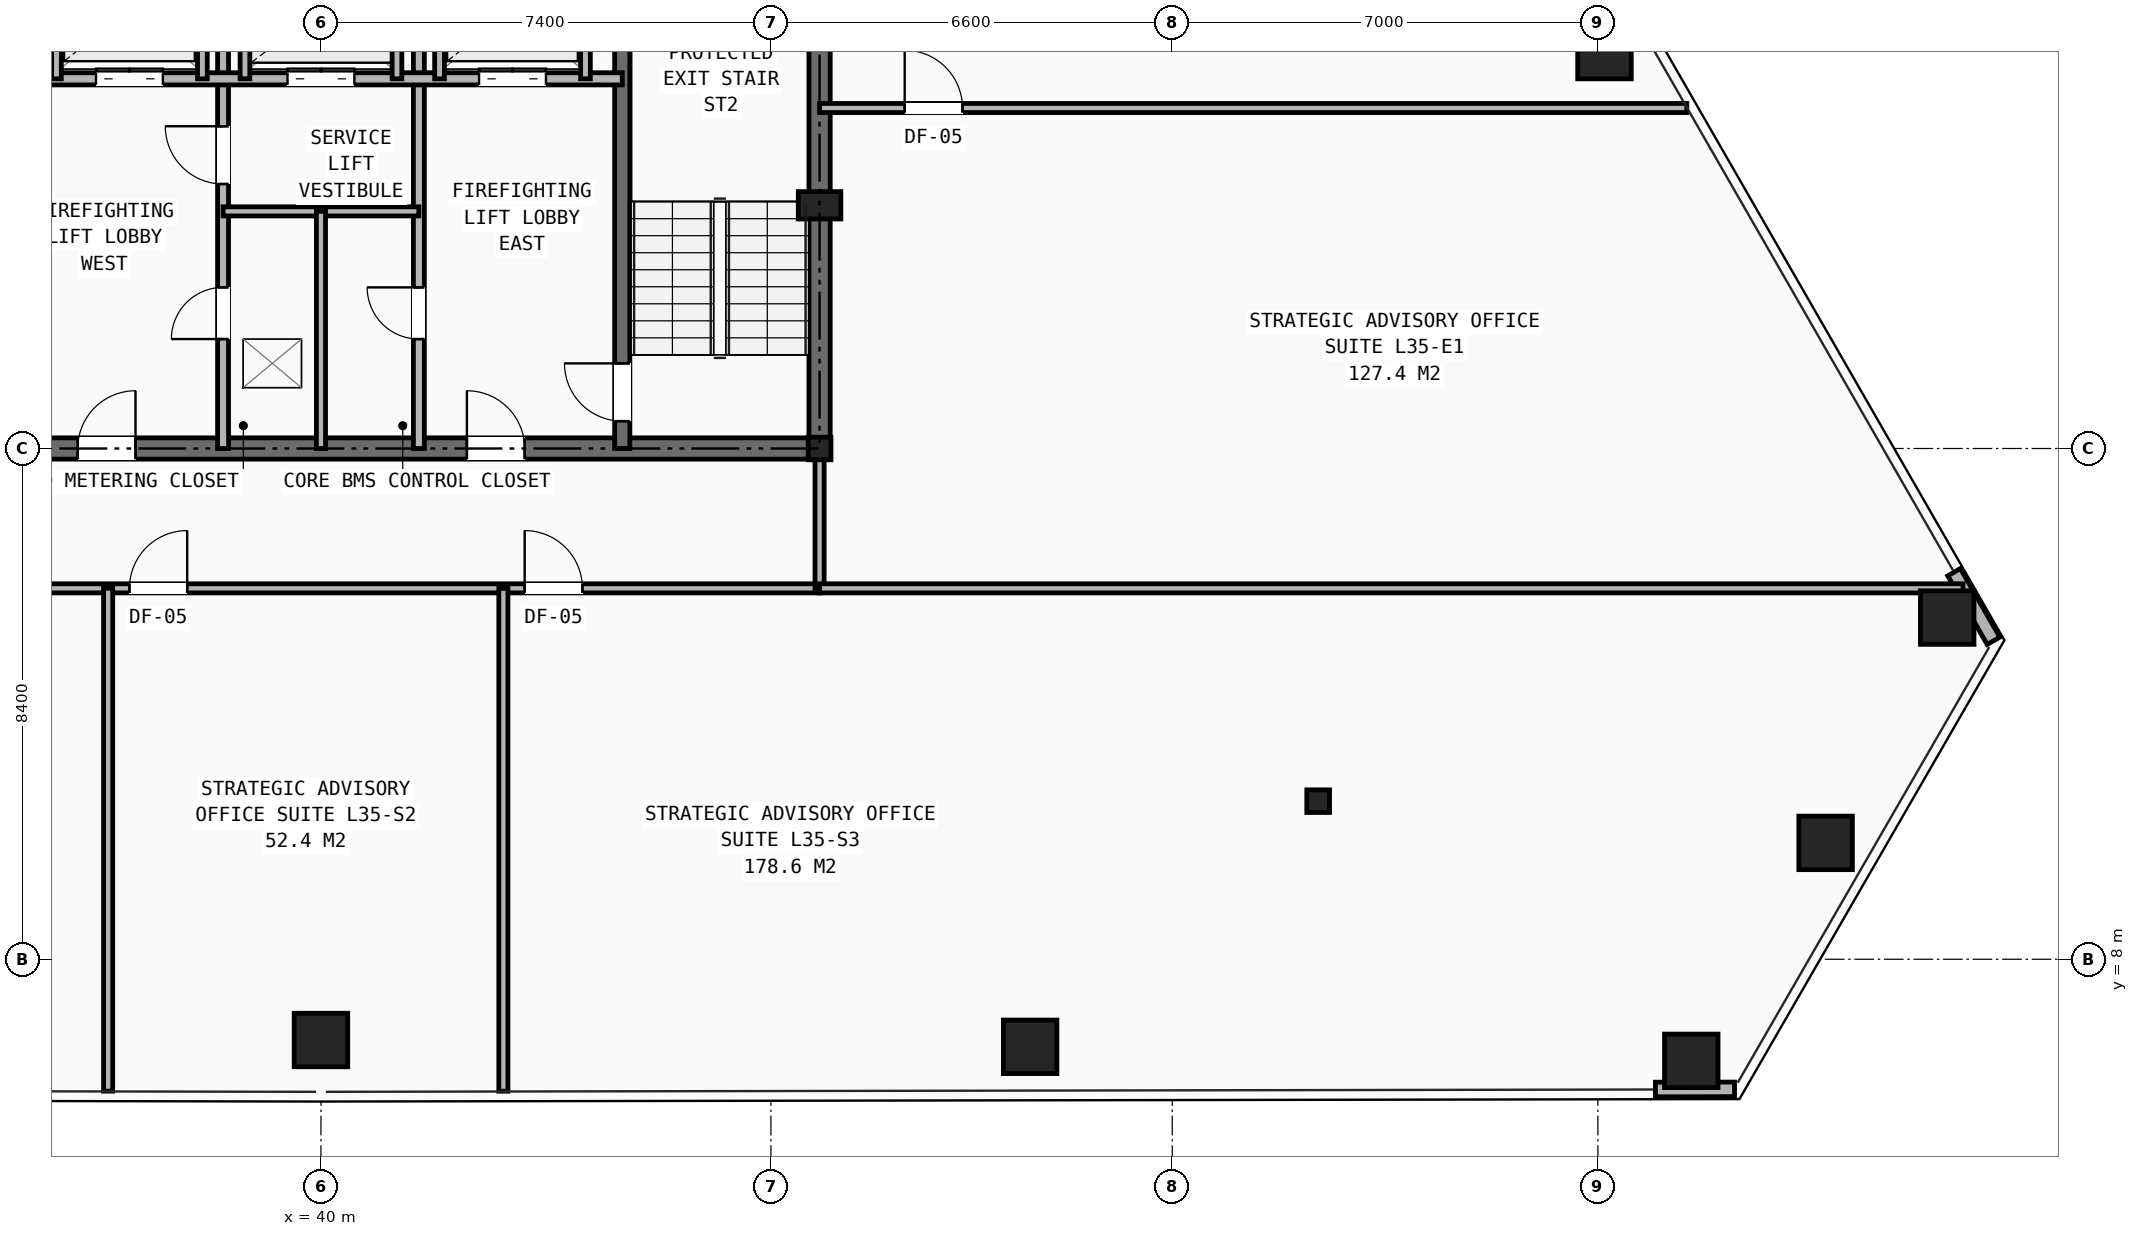
"""IFC4 building model, lengths in metres.
Left out: names, types, materials, properties, quantities, classifications, styles, units other than length and angle.
Written with IfcOpenShell. Run it as: python <this file> out.ifc"""

import sys

from ifc_helpers import new_model, si_unit, direction, frame, frame_2d, origin, origin_2d, place, context, subcontext, project, spatial, rectangle, hollow_rectangle, i_section, extrude, element, fill, save


model = new_model("IFC4")
c1 = context("Model", 3, precision=1e-05, world=origin(), true_north=direction((0.0, 1.0)))
c2 = subcontext(c1, "Body", "Model", "MODEL_VIEW")
j1 = project(units=[si_unit("LENGTHUNIT", "METRE"), si_unit("PLANEANGLEUNIT", "RADIAN")], contexts=[c1])
p1 = place(None, origin())
s1 = spatial("IfcSite", under=j1, at=p1, CompositionType="ELEMENT")
p2 = place(p1, origin())
s2 = spatial("IfcBuilding", under=s1, at=p2, CompositionType="ELEMENT")
p3 = place(p2, frame((0.0, 0.0, 122.9)))
s3 = spatial("IfcBuildingStorey", under=s2, at=p3, CompositionType="ELEMENT", Elevation=122.9)
for number, where, z_axis, x_axis in (
    (1, (48.2, 16.4, 0.0), (0.0, 0.0, 1.0), (1.0, 0.0, 0.0)),
    (2, (56.4, 10.6, 0.0), (0.0, 0.0, 1.0), (1.0, 0.0, 0.0)),
):
    element("IfcColumn", number, at=place(p3, frame(where, z_axis=z_axis, x_axis=x_axis)), inside=s3, PredefinedType="COLUMN", context=c2, shape_type="SweptSolid", body=[
        extrude(i_section(OverallWidth=0.374, OverallDepth=0.372, WebThickness=0.016, FlangeThickness=0.026, at=origin_2d()), origin(), (0.0, 0.0, 1.0), 3.45),
    ])
p4 = place(p3, frame((48.2, 20.4, 0.0), z_axis=(0.0, 0.0, 1.0), x_axis=(1.0, 0.0, 0.0)))
e3 = element("IfcColumn", 3, at=p4, inside=s3, PredefinedType="PILASTER", context=c2, shape_type="SweptSolid", body=[
    extrude(rectangle(XDim=0.7, YDim=0.45, at=origin_2d()), origin(), (0.0, 0.0, 1.0), 3.45),
])
for number, where, z_axis, x_axis in (
    (4, (40.0, 6.671, 0.0), (0.0, 0.0, 1.0), (1.0, 0.0, 0.0)),
    (5, (51.663, 6.56, 0.0), (0.0, 0.0, 1.0), (1.0, 0.0, 0.0)),
    (6, (62.536, 6.329, 0.0), (0.0, 0.0, 1.0), (1.0, 0.0, 0.0)),
    (7, (64.745, 9.913, 0.0), (0.0, 0.0, 1.0), (1.0, 0.0, 0.0)),
    (8, (66.745, 13.619, 0.0), (0.0, 0.0, 1.0), (1.0, 0.0, 0.0)),
    (9, (61.108, 22.92, 0.0), (0.0, 0.0, 1.0), (1.0, 0.0, 0.0)),
):
    element("IfcColumn", number, at=place(p3, frame(where, z_axis=z_axis, x_axis=x_axis)), inside=s3, PredefinedType="COLUMN", context=c2, shape_type="SweptSolid", body=[
        extrude(hollow_rectangle(XDim=0.88, YDim=0.88, WallThickness=0.06, at=origin_2d()), origin(), (0.0, 0.0, 1.0), 3.45),
    ])
p5 = place(p3, frame((61.946, 5.858, 0.0), z_axis=(0.0, 0.0, 1.0), x_axis=(0.999998574928, 0.001688236199, 0.0)))
e10 = element("IfcWall", 10, at=p5, inside=s3, PredefinedType="SHEAR", context=c2, shape_type="SweptSolid", body=[
    extrude(rectangle(XDim=1.302, YDim=0.24, at=frame_2d((0.651, 0.0))), origin(), (0.0, 0.0, 1.0), 2.583),
])
p6 = place(p3, frame((67.507, 13.237, 0.0), z_axis=(0.0, 0.0, 1.0), x_axis=(-0.498460550087, 0.86691238312, 0.0)))
e11 = element("IfcWall", 11, at=p6, inside=s3, PredefinedType="SHEAR", context=c2, shape_type="SweptSolid", body=[
    extrude(rectangle(XDim=1.301, YDim=0.24, at=frame_2d((0.651, 0.0))), origin(), (0.0, 0.0, 1.0), 2.583),
])
p7 = place(p3, frame((31.8, 16.4, 0.0), z_axis=(0.0, 0.0, 1.0), x_axis=(1.0, 0.0, 0.0)))
e12 = element("IfcWall", 12, at=p7, inside=s3, PredefinedType="SHEAR", context=c2, shape_type="SweptSolid", body=[
    extrude(rectangle(XDim=16.4, YDim=0.35, at=frame_2d((8.2, 0.0))), origin(), (0.0, 0.0, 1.0), 3.21),
])
p8 = place(p7, frame((4.2, 0.0, 0.0)))
e13 = element("IfcOpeningElement", 13, at=p8, cuts=e12, PredefinedType="OPENING", context=c2, shape_type="SweptSolid", body=[
    extrude(rectangle(XDim=0.95, YDim=2.1, at=frame_2d((0.475, 1.05))), frame((0.0, 0.185, 0.0), z_axis=(0.0, -1.0, 0.0), x_axis=(1.0, 0.0, 0.0)), (0.0, 0.0, 1.0), 0.37),
])
p9 = place(p7, frame((10.6, 0.0, 0.0)))
e14 = element("IfcOpeningElement", 14, at=p9, cuts=e12, PredefinedType="OPENING", context=c2, shape_type="SweptSolid", body=[
    extrude(rectangle(XDim=0.95, YDim=2.1, at=frame_2d((0.475, 1.05))), frame((0.0, 0.185, 0.0), z_axis=(0.0, -1.0, 0.0), x_axis=(1.0, 0.0, 0.0)), (0.0, 0.0, 1.0), 0.37),
])
p10 = place(p3, frame((48.2, 16.4, 0.0), z_axis=(0.0, 0.0, 1.0), x_axis=(0.0, 1.0, 0.0)))
e15 = element("IfcWall", 15, at=p10, inside=s3, PredefinedType="SHEAR", context=c2, shape_type="SweptSolid", body=[
    extrude(rectangle(XDim=14.8, YDim=0.35, at=frame_2d((7.4, 0.0))), origin(), (0.0, 0.0, 1.0), 3.21),
])
p11 = place(p10, frame((11.0, 0.0, 0.0)))
e16 = element("IfcOpeningElement", 16, at=p11, cuts=e15, PredefinedType="OPENING", context=c2, shape_type="SweptSolid", body=[
    extrude(rectangle(XDim=1.1, YDim=2.15, at=frame_2d((0.55, 1.075))), frame((0.0, 0.185, 0.0), z_axis=(0.0, -1.0, 0.0), x_axis=(1.0, 0.0, 0.0)), (0.0, 0.0, 1.0), 0.37),
])
p12 = place(p3, frame((44.955, 16.4, 0.0), z_axis=(0.0, 0.0, 1.0), x_axis=(0.0, 1.0, 0.0)))
e17 = element("IfcWall", 17, at=p12, inside=s3, PredefinedType="SHEAR", context=c2, shape_type="SweptSolid", body=[
    extrude(rectangle(XDim=8.4, YDim=0.25, at=frame_2d((4.2, 0.0))), origin(), (0.0, 0.0, 1.0), 3.21),
])
p13 = place(p12, frame((0.45, 0.0, 0.0)))
e18 = element("IfcOpeningElement", 18, at=p13, cuts=e17, PredefinedType="OPENING", context=c2, shape_type="SweptSolid", body=[
    extrude(rectangle(XDim=0.95, YDim=2.1, at=frame_2d((0.475, 1.05))), frame((0.0, 0.135, 0.0), z_axis=(0.0, -1.0, 0.0), x_axis=(1.0, 0.0, 0.0)), (0.0, 0.0, 1.0), 0.27),
])
p14 = place(p3, frame((38.39, 16.4, 0.0), z_axis=(0.0, 0.0, 1.0), x_axis=(0.0, 1.0, 0.0)))
e19 = element("IfcWall", 19, at=p14, inside=s3, PredefinedType="PARTITIONING", context=c2, shape_type="SweptSolid", body=[
    extrude(rectangle(XDim=8.4, YDim=0.18, at=frame_2d((4.2, 0.0))), origin(), (0.0, 0.0, 1.0), 2.938),
])
p15 = place(p14, frame((1.8, 0.0, 0.0)))
e20 = element("IfcOpeningElement", 20, at=p15, cuts=e19, PredefinedType="OPENING", context=c2, shape_type="SweptSolid", body=[
    extrude(rectangle(XDim=0.85, YDim=2.05, at=frame_2d((0.425, 1.025))), frame((0.0, 0.1, 0.0), z_axis=(0.0, -1.0, 0.0), x_axis=(1.0, 0.0, 0.0)), (0.0, 0.0, 1.0), 0.2),
])
p16 = place(p14, frame((4.35, 0.0, 0.0)))
e21 = element("IfcOpeningElement", 21, at=p16, cuts=e19, PredefinedType="OPENING", context=c2, shape_type="SweptSolid", body=[
    extrude(rectangle(XDim=0.95, YDim=2.1, at=frame_2d((0.475, 1.05))), frame((0.0, 0.1, 0.0), z_axis=(0.0, -1.0, 0.0), x_axis=(1.0, 0.0, 0.0)), (0.0, 0.0, 1.0), 0.2),
])
p17 = place(p3, frame((41.61, 16.4, 0.0), z_axis=(0.0, 0.0, 1.0), x_axis=(0.0, 1.0, 0.0)))
e22 = element("IfcWall", 22, at=p17, inside=s3, PredefinedType="PARTITIONING", context=c2, shape_type="SweptSolid", body=[
    extrude(rectangle(XDim=8.4, YDim=0.18, at=frame_2d((4.2, 0.0))), origin(), (0.0, 0.0, 1.0), 2.938),
])
p18 = place(p17, frame((1.8, 0.0, 0.0)))
e23 = element("IfcOpeningElement", 23, at=p18, cuts=e22, PredefinedType="OPENING", context=c2, shape_type="SweptSolid", body=[
    extrude(rectangle(XDim=0.85, YDim=2.05, at=frame_2d((0.425, 1.025))), frame((0.0, 0.1, 0.0), z_axis=(0.0, -1.0, 0.0), x_axis=(1.0, 0.0, 0.0)), (0.0, 0.0, 1.0), 0.2),
])
p19 = place(p3, frame((35.045, 22.48, 0.0), z_axis=(0.0, 0.0, 1.0), x_axis=(1.0, 0.0, 0.0)))
e24 = element("IfcWall", 24, at=p19, inside=s3, PredefinedType="SOLIDWALL", context=c2, shape_type="SweptSolid", body=[
    extrude(rectangle(XDim=9.91, YDim=0.2, at=frame_2d((4.955, 0.0))), origin(), (0.0, 0.0, 1.0), 3.21),
])
p20 = place(p19, frame((1.255, 0.0, 0.0)))
e25 = element("IfcOpeningElement", 25, at=p20, cuts=e24, PredefinedType="OPENING", context=c2, shape_type="SweptSolid", body=[
    extrude(rectangle(XDim=1.1, YDim=2.15, at=frame_2d((0.55, 1.075))), frame((0.0, 0.11, 0.0), z_axis=(0.0, -1.0, 0.0), x_axis=(1.0, 0.0, 0.0)), (0.0, 0.0, 1.0), 0.22),
])
p21 = place(p19, frame((7.555, 0.0, 0.0)))
e26 = element("IfcOpeningElement", 26, at=p21, cuts=e24, PredefinedType="OPENING", context=c2, shape_type="SweptSolid", body=[
    extrude(rectangle(XDim=1.1, YDim=2.15, at=frame_2d((0.55, 1.075))), frame((0.0, 0.11, 0.0), z_axis=(0.0, -1.0, 0.0), x_axis=(1.0, 0.0, 0.0)), (0.0, 0.0, 1.0), 0.22),
])
p22 = place(p19, frame((4.405, 0.0, 0.0)))
e27 = element("IfcOpeningElement", 27, at=p22, cuts=e24, PredefinedType="OPENING", context=c2, shape_type="SweptSolid", body=[
    extrude(rectangle(XDim=1.1, YDim=2.15, at=frame_2d((0.55, 1.075))), frame((0.0, 0.11, 0.0), z_axis=(0.0, -1.0, 0.0), x_axis=(1.0, 0.0, 0.0)), (0.0, 0.0, 1.0), 0.22),
])
p23 = place(p3, frame((38.39, 20.3, 0.0), z_axis=(0.0, 0.0, 1.0), x_axis=(1.0, 0.0, 0.0)))
e28 = element("IfcWall", 28, at=p23, inside=s3, PredefinedType="PARTITIONING", context=c2, shape_type="SweptSolid", body=[
    extrude(rectangle(XDim=3.22, YDim=0.15, at=frame_2d((1.61, 0.0))), origin(), (0.0, 0.0, 1.0), 3.21),
])
p24 = place(p3, frame((40.0, 16.4, 0.0), z_axis=(0.0, 0.0, 1.0), x_axis=(0.0, 1.0, 0.0)))
e29 = element("IfcWall", 29, at=p24, inside=s3, PredefinedType="PARTITIONING", context=c2, shape_type="SweptSolid", body=[
    extrude(rectangle(XDim=3.9, YDim=0.15, at=frame_2d((1.95, 0.0))), origin(), (0.0, 0.0, 1.0), 2.938),
])
for number, where, z_axis, x_axis in (
    (30, (35.65, 22.48, 0.0), (0.0, 0.0, 1.0), (0.0, 1.0, 0.0)),
    (31, (38.05, 22.48, 0.0), (0.0, 0.0, 1.0), (0.0, 1.0, 0.0)),
    (32, (41.95, 22.48, 0.0), (0.0, 0.0, 1.0), (0.0, 1.0, 0.0)),
    (33, (44.35, 22.48, 0.0), (0.0, 0.0, 1.0), (0.0, 1.0, 0.0)),
    (34, (38.75, 22.48, 0.0), (0.0, 0.0, 1.0), (0.0, 1.0, 0.0)),
    (35, (41.25, 22.48, 0.0), (0.0, 0.0, 1.0), (0.0, 1.0, 0.0)),
):
    element("IfcWall", number, at=place(p3, frame(where, z_axis=z_axis, x_axis=x_axis)), inside=s3, PredefinedType="SOLIDWALL", context=c2, shape_type="SweptSolid", body=[
        extrude(rectangle(XDim=2.32, YDim=0.16, at=frame_2d((1.16, 0.0))), origin(), (0.0, 0.0, 1.0), 3.21),
    ])
p25 = place(p3, frame((29.6, 14.1, 0.0), z_axis=(0.0, 0.0, 1.0), x_axis=(1.0, 0.0, 0.0)))
e36 = element("IfcWall", 36, at=p25, inside=s3, PredefinedType="PARTITIONING", context=c2, shape_type="SweptSolid", body=[
    extrude(rectangle(XDim=18.6, YDim=0.15, at=frame_2d((9.3, 0.0))), origin(), (0.0, 0.0, 1.0), 2.252),
])
p26 = place(p25, frame((0.55, 0.0, 0.0)))
e37 = element("IfcOpeningElement", 37, at=p26, cuts=e36, PredefinedType="OPENING", context=c2, shape_type="SweptSolid", body=[
    extrude(rectangle(XDim=0.95, YDim=2.1, at=frame_2d((0.475, 1.05))), frame((0.0, 0.085, 0.0), z_axis=(0.0, -1.0, 0.0), x_axis=(1.0, 0.0, 0.0)), (0.0, 0.0, 1.0), 0.17),
])
p27 = place(p25, frame((7.25, 0.0, 0.0)))
e38 = element("IfcOpeningElement", 38, at=p27, cuts=e36, PredefinedType="OPENING", context=c2, shape_type="SweptSolid", body=[
    extrude(rectangle(XDim=0.95, YDim=2.1, at=frame_2d((0.475, 1.05))), frame((0.0, 0.085, 0.0), z_axis=(0.0, -1.0, 0.0), x_axis=(1.0, 0.0, 0.0)), (0.0, 0.0, 1.0), 0.17),
])
p28 = place(p25, frame((13.75, 0.0, 0.0)))
e39 = element("IfcOpeningElement", 39, at=p28, cuts=e36, PredefinedType="OPENING", context=c2, shape_type="SweptSolid", body=[
    extrude(rectangle(XDim=0.95, YDim=2.1, at=frame_2d((0.475, 1.05))), frame((0.0, 0.085, 0.0), z_axis=(0.0, -1.0, 0.0), x_axis=(1.0, 0.0, 0.0)), (0.0, 0.0, 1.0), 0.17),
])
p29 = place(p3, frame((48.2, 14.1, 0.0), z_axis=(0.0, 0.0, 1.0), x_axis=(0.0, 1.0, 0.0)))
e40 = element("IfcWall", 40, at=p29, inside=s3, PredefinedType="PARTITIONING", context=c2, shape_type="SweptSolid", body=[
    extrude(rectangle(XDim=2.3, YDim=0.15, at=frame_2d((1.15, 0.0))), origin(), (0.0, 0.0, 1.0), 2.661),
])
p30 = place(p3, frame((36.5, 5.83, 0.0), z_axis=(0.0, 0.0, 1.0), x_axis=(0.0, 1.0, 0.0)))
e41 = element("IfcWall", 41, at=p30, inside=s3, PredefinedType="PARTITIONING", context=c2, shape_type="SweptSolid", body=[
    extrude(rectangle(XDim=8.27, YDim=0.15, at=frame_2d((4.135, 0.0))), origin(), (0.0, 0.0, 1.0), 2.252),
])
p31 = place(p3, frame((43.0, 5.83, 0.0), z_axis=(0.0, 0.0, 1.0), x_axis=(0.0, 1.0, 0.0)))
e42 = element("IfcWall", 42, at=p31, inside=s3, PredefinedType="PARTITIONING", context=c2, shape_type="SweptSolid", body=[
    extrude(rectangle(XDim=8.271, YDim=0.15, at=frame_2d((4.135, 0.0))), origin(), (0.0, 0.0, 1.0), 2.589),
])
p32 = place(p3, frame((48.2, 14.1, 0.0), z_axis=(0.0, 0.0, 1.0), x_axis=(1.0, 0.0, 0.0)))
e43 = element("IfcWall", 43, at=p32, inside=s3, PredefinedType="PARTITIONING", context=c2, shape_type="SweptSolid", body=[
    extrude(rectangle(XDim=18.805, YDim=0.15, at=frame_2d((9.402, 0.0))), origin(), (0.0, 0.0, 1.0), 2.589),
])
p33 = place(p3, frame((48.2, 22.0, 0.0), z_axis=(0.0, 0.0, 1.0), x_axis=(1.0, 0.0, 0.0)))
e44 = element("IfcWall", 44, at=p33, inside=s3, PredefinedType="PARTITIONING", context=c2, shape_type="SweptSolid", body=[
    extrude(rectangle(XDim=14.262, YDim=0.15, at=frame_2d((7.131, 0.0))), origin(), (0.0, 0.0, 1.0), 2.589),
])
p34 = place(p33, frame((1.4, 0.0, 0.0)))
e45 = element("IfcOpeningElement", 45, at=p34, cuts=e44, PredefinedType="OPENING", context=c2, shape_type="SweptSolid", body=[
    extrude(rectangle(XDim=0.95, YDim=2.1, at=frame_2d((0.475, 1.05))), frame((0.0, 0.085, 0.0), z_axis=(0.0, -1.0, 0.0), x_axis=(1.0, 0.0, 0.0)), (0.0, 0.0, 1.0), 0.17),
])
p35 = place(p15, origin())
e46 = element("IfcDoor", 46, at=p35, inside=s3, OperationType="SINGLE_SWING_LEFT", PredefinedType="DOOR", context=c2, shape_type="SweptSolid", body=[
    extrude(rectangle(XDim=0.85, YDim=2.05, at=frame_2d((0.425, 1.025))), frame((0.0, 0.025, 0.0), z_axis=(0.0, -1.0, 0.0), x_axis=(1.0, 0.0, 0.0)), (0.0, 0.0, 1.0), 0.05),
])
fill(e20, e46)
p36 = place(p18, origin())
e47 = element("IfcDoor", 47, at=p36, inside=s3, OperationType="SINGLE_SWING_RIGHT", PredefinedType="DOOR", context=c2, shape_type="SweptSolid", body=[
    extrude(rectangle(XDim=0.85, YDim=2.05, at=frame_2d((0.425, 1.025))), frame((0.0, 0.025, 0.0), z_axis=(0.0, -1.0, 0.0), x_axis=(1.0, 0.0, 0.0)), (0.0, 0.0, 1.0), 0.05),
])
fill(e23, e47)
p37 = place(p16, origin())
e48 = element("IfcDoor", 48, at=p37, inside=s3, OperationType="SINGLE_SWING_RIGHT", PredefinedType="DOOR", context=c2, shape_type="SweptSolid", body=[
    extrude(rectangle(XDim=0.95, YDim=2.1, at=frame_2d((0.475, 1.05))), frame((0.0, 0.025, 0.0), z_axis=(0.0, -1.0, 0.0), x_axis=(1.0, 0.0, 0.0)), (0.0, 0.0, 1.0), 0.05),
])
fill(e21, e48)
p38 = place(p13, origin())
e49 = element("IfcDoor", 49, at=p38, inside=s3, OperationType="SINGLE_SWING_RIGHT", PredefinedType="DOOR", context=c2, shape_type="SweptSolid", body=[
    extrude(rectangle(XDim=0.95, YDim=2.1, at=frame_2d((0.475, 1.05))), frame((0.0, 0.025, 0.0), z_axis=(0.0, -1.0, 0.0), x_axis=(1.0, 0.0, 0.0)), (0.0, 0.0, 1.0), 0.05),
])
fill(e18, e49)
p39 = place(p8, origin())
e50 = element("IfcDoor", 50, at=p39, inside=s3, OperationType="SINGLE_SWING_RIGHT", PredefinedType="DOOR", context=c2, shape_type="SweptSolid", body=[
    extrude(rectangle(XDim=0.95, YDim=2.1, at=frame_2d((0.475, 1.05))), frame((0.0, 0.025, 0.0), z_axis=(0.0, -1.0, 0.0), x_axis=(1.0, 0.0, 0.0)), (0.0, 0.0, 1.0), 0.05),
])
fill(e13, e50)
p40 = place(p9, origin())
e51 = element("IfcDoor", 51, at=p40, inside=s3, OperationType="SINGLE_SWING_LEFT", PredefinedType="DOOR", context=c2, shape_type="SweptSolid", body=[
    extrude(rectangle(XDim=0.95, YDim=2.1, at=frame_2d((0.475, 1.05))), frame((0.0, 0.025, 0.0), z_axis=(0.0, -1.0, 0.0), x_axis=(1.0, 0.0, 0.0)), (0.0, 0.0, 1.0), 0.05),
])
fill(e14, e51)
p41 = place(p20, origin())
e52 = element("IfcDoor", 52, at=p41, inside=s3, OperationType="DOUBLE_DOOR_SLIDING", PredefinedType="DOOR", context=c2, shape_type="SweptSolid", body=[
    extrude(rectangle(XDim=1.1, YDim=2.15, at=frame_2d((0.55, 1.075))), frame((0.0, 0.025, 0.0), z_axis=(0.0, -1.0, 0.0), x_axis=(1.0, 0.0, 0.0)), (0.0, 0.0, 1.0), 0.05),
])
fill(e25, e52)
p42 = place(p21, origin())
e53 = element("IfcDoor", 53, at=p42, inside=s3, OperationType="DOUBLE_DOOR_SLIDING", PredefinedType="DOOR", context=c2, shape_type="SweptSolid", body=[
    extrude(rectangle(XDim=1.1, YDim=2.15, at=frame_2d((0.55, 1.075))), frame((0.0, 0.025, 0.0), z_axis=(0.0, -1.0, 0.0), x_axis=(1.0, 0.0, 0.0)), (0.0, 0.0, 1.0), 0.05),
])
fill(e26, e53)
p43 = place(p22, origin())
e54 = element("IfcDoor", 54, at=p43, inside=s3, OperationType="DOUBLE_DOOR_SLIDING", PredefinedType="DOOR", context=c2, shape_type="SweptSolid", body=[
    extrude(rectangle(XDim=1.1, YDim=2.15, at=frame_2d((0.55, 1.075))), frame((0.0, 0.025, 0.0), z_axis=(0.0, -1.0, 0.0), x_axis=(1.0, 0.0, 0.0)), (0.0, 0.0, 1.0), 0.05),
])
fill(e27, e54)
p44 = place(p27, origin())
e55 = element("IfcDoor", 55, at=p44, inside=s3, OperationType="SINGLE_SWING_RIGHT", PredefinedType="DOOR", context=c2, shape_type="SweptSolid", body=[
    extrude(rectangle(XDim=0.95, YDim=2.1, at=frame_2d((0.475, 1.05))), frame((0.0, 0.025, 0.0), z_axis=(0.0, -1.0, 0.0), x_axis=(1.0, 0.0, 0.0)), (0.0, 0.0, 1.0), 0.05),
])
fill(e38, e55)
p45 = place(p28, origin())
e56 = element("IfcDoor", 56, at=p45, inside=s3, OperationType="SINGLE_SWING_LEFT", PredefinedType="DOOR", context=c2, shape_type="SweptSolid", body=[
    extrude(rectangle(XDim=0.95, YDim=2.1, at=frame_2d((0.475, 1.05))), frame((0.0, 0.025, 0.0), z_axis=(0.0, -1.0, 0.0), x_axis=(1.0, 0.0, 0.0)), (0.0, 0.0, 1.0), 0.05),
])
fill(e39, e56)
p46 = place(p34, origin())
e57 = element("IfcDoor", 57, at=p46, inside=s3, OperationType="SINGLE_SWING_LEFT", PredefinedType="DOOR", context=c2, shape_type="SweptSolid", body=[
    extrude(rectangle(XDim=0.95, YDim=2.1, at=frame_2d((0.475, 1.05))), frame((0.0, 0.025, 0.0), z_axis=(0.0, -1.0, 0.0), x_axis=(1.0, 0.0, 0.0)), (0.0, 0.0, 1.0), 0.05),
])
fill(e45, e57)
save(model, sys.argv[1])
